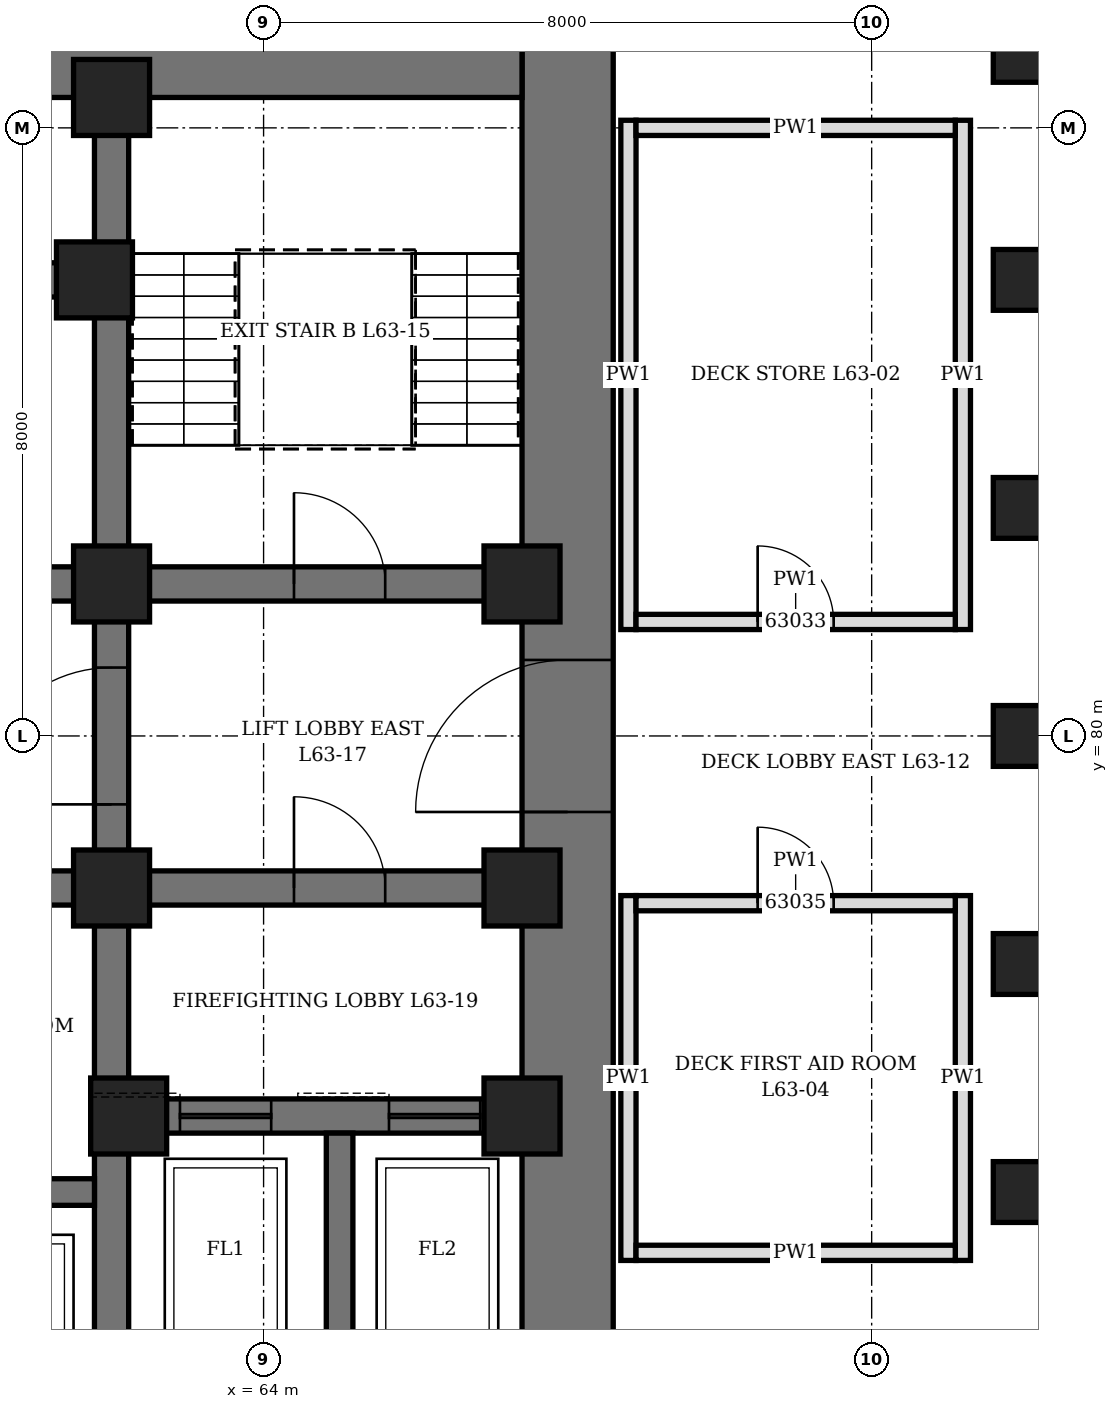
"""IFC4 building model, lengths in metres.
Left out: names, types, materials, properties, quantities, classifications, styles, units other than length and angle.
Written with IfcOpenShell. Run it as: python <this file> out.ifc"""

import sys

from ifc_helpers import new_model, si_unit, direction, frame, frame_2d, origin, origin_2d, place, context, subcontext, project, spatial, rectangle, hollow_rectangle, extrude, element, fill, save


model = new_model("IFC4")
c1 = context("Model", 3, precision=1e-05, world=origin(), true_north=direction((0.0, 1.0)))
c2 = subcontext(c1, "Body", "Model", "MODEL_VIEW")
j1 = project(units=[si_unit("LENGTHUNIT", "METRE"), si_unit("PLANEANGLEUNIT", "RADIAN")], contexts=[c1])
p1 = place(None, origin())
s1 = spatial("IfcSite", under=j1, at=p1, CompositionType="ELEMENT")
p2 = place(p1, origin())
s2 = spatial("IfcBuilding", under=s1, at=p2, CompositionType="ELEMENT")
p3 = place(p2, frame((0.0, 0.0, 279.7)))
s3 = spatial("IfcBuildingStorey", under=s2, at=p3, CompositionType="ELEMENT", Elevation=279.7)
for number, where, z_axis, x_axis in (
    (1, (74.0, 74.0, -0.25), (0.0, 0.0, 1.0), (0.0, 1.0, 0.0)),
    (2, (74.0, 77.0, -0.25), (0.0, 0.0, 1.0), (0.0, 1.0, 0.0)),
    (3, (74.0, 80.0, -0.25), (0.0, 0.0, 1.0), (0.0, 1.0, 0.0)),
    (4, (74.0, 83.0, -0.25), (0.0, 0.0, 1.0), (0.0, 1.0, 0.0)),
    (5, (74.0, 86.0, -0.25), (0.0, 0.0, 1.0), (0.0, 1.0, 0.0)),
    (6, (74.0, 89.0, -0.25), (0.0, 0.0, 1.0), (0.0, 1.0, 0.0)),
):
    element("IfcColumn", number, at=place(p3, frame(where, z_axis=z_axis, x_axis=x_axis)), inside=s3, PredefinedType="COLUMN", context=c2, shape_type="SweptSolid", body=[
        extrude(hollow_rectangle(XDim=0.8, YDim=0.8, WallThickness=0.1, at=origin_2d()), origin(), (0.0, 0.0, 1.0), 6.25),
    ])
p4 = place(p3, frame((68.0, 70.4, 0.0), z_axis=(0.0, 0.0, 1.0), x_axis=(0.0, 1.0, 0.0)))
e7 = element("IfcWall", 7, at=p4, inside=s3, PredefinedType="SHEAR", context=c2, shape_type="SweptSolid", body=[
    extrude(rectangle(XDim=19.2, YDim=1.2, at=frame_2d((9.6, 0.0))), origin(), (0.0, 0.0, 1.0), 6.0),
])
p5 = place(p4, frame((8.6, 0.0, 0.0)))
e8 = element("IfcOpeningElement", 8, at=p5, cuts=e7, PredefinedType="OPENING", context=c2, shape_type="SweptSolid", body=[
    extrude(rectangle(XDim=2.0, YDim=2.4, at=frame_2d((1.0, 1.2))), frame((0.0, 0.61, 0.0), z_axis=(0.0, -1.0, 0.0), x_axis=(1.0, 0.0, 0.0)), (0.0, 0.0, 1.0), 1.22),
])
p6 = place(p3, frame((44.6, 89.0, 0.0), z_axis=(0.0, 0.0, 1.0), x_axis=(1.0, 0.0, 0.0)))
e9 = element("IfcWall", 9, at=p6, inside=s3, PredefinedType="SHEAR", context=c2, shape_type="SweptSolid", body=[
    extrude(rectangle(XDim=22.8, YDim=1.2, at=frame_2d((11.4, 0.0))), origin(), (0.0, 0.0, 1.0), 6.0),
])
p7 = place(p6, frame((7.9, 0.0, 0.0)))
e10 = element("IfcOpeningElement", 10, at=p7, cuts=e9, PredefinedType="OPENING", context=c2, shape_type="SweptSolid", body=[
    extrude(rectangle(XDim=1.0, YDim=2.1, at=frame_2d((0.5, 1.05))), frame((0.0, 0.61, 0.0), z_axis=(0.0, -1.0, 0.0), x_axis=(1.0, 0.0, 0.0)), (0.0, 0.0, 1.0), 1.22),
])
p8 = place(p6, frame((12.025, 0.0, 0.0)))
e11 = element("IfcOpeningElement", 11, at=p8, cuts=e9, PredefinedType="OPENING", context=c2, shape_type="SweptSolid", body=[
    extrude(rectangle(XDim=0.9, YDim=2.1, at=frame_2d((0.45, 1.05))), frame((0.0, 0.61, 0.0), z_axis=(0.0, -1.0, 0.0), x_axis=(1.0, 0.0, 0.0)), (0.0, 0.0, 1.0), 1.22),
])
p9 = place(p6, frame((13.962, 0.0, 0.0)))
e12 = element("IfcOpeningElement", 12, at=p9, cuts=e9, PredefinedType="OPENING", context=c2, shape_type="SweptSolid", body=[
    extrude(rectangle(XDim=0.9, YDim=2.1, at=frame_2d((0.45, 1.05))), frame((0.0, 0.61, 0.0), z_axis=(0.0, -1.0, 0.0), x_axis=(1.0, 0.0, 0.0)), (0.0, 0.0, 1.0), 1.22),
])
p10 = place(p3, frame((62.0, 71.6, 0.0), z_axis=(0.0, 0.0, 1.0), x_axis=(0.0, 1.0, 0.0)))
e13 = element("IfcWall", 13, at=p10, inside=s3, PredefinedType="SHEAR", context=c2, shape_type="SweptSolid", body=[
    extrude(rectangle(XDim=16.8, YDim=0.45, at=frame_2d((8.4, 0.0))), origin(), (0.0, 0.0, 1.0), 6.0),
])
p11 = place(p10, frame((7.5, 0.0, 0.0)))
e14 = element("IfcOpeningElement", 14, at=p11, cuts=e13, PredefinedType="OPENING", context=c2, shape_type="SweptSolid", body=[
    extrude(rectangle(XDim=1.8, YDim=2.4, at=frame_2d((0.9, 1.2))), frame((0.0, 0.235, 0.0), z_axis=(0.0, -1.0, 0.0), x_axis=(1.0, 0.0, 0.0)), (0.0, 0.0, 1.0), 0.47),
])
p12 = place(p3, frame((62.225, 75.0, 0.0), z_axis=(0.0, 0.0, 1.0), x_axis=(1.0, 0.0, 0.0)))
e15 = element("IfcWall", 15, at=p12, inside=s3, PredefinedType="SHEAR", context=c2, shape_type="SweptSolid", body=[
    extrude(rectangle(XDim=5.175, YDim=0.45, at=frame_2d((2.587, 0.0))), origin(), (0.0, 0.0, 1.0), 6.0),
])
p13 = place(p12, frame((0.675, 0.0, 0.0)))
e16 = element("IfcOpeningElement", 16, at=p13, cuts=e15, PredefinedType="OPENING", context=c2, shape_type="SweptSolid", body=[
    extrude(rectangle(XDim=1.2, YDim=2.2, at=frame_2d((0.6, 1.1))), frame((0.0, 0.235, 0.0), z_axis=(0.0, -1.0, 0.0), x_axis=(1.0, 0.0, 0.0)), (0.0, 0.0, 1.0), 0.47),
])
p14 = place(p12, frame((3.425, 0.0, 0.0)))
e17 = element("IfcOpeningElement", 17, at=p14, cuts=e15, PredefinedType="OPENING", context=c2, shape_type="SweptSolid", body=[
    extrude(rectangle(XDim=1.2, YDim=2.2, at=frame_2d((0.6, 1.1))), frame((0.0, 0.235, 0.0), z_axis=(0.0, -1.0, 0.0), x_axis=(1.0, 0.0, 0.0)), (0.0, 0.0, 1.0), 0.47),
])
p15 = place(p3, frame((62.225, 78.0, 0.0), z_axis=(0.0, 0.0, 1.0), x_axis=(1.0, 0.0, 0.0)))
e18 = element("IfcWall", 18, at=p15, inside=s3, PredefinedType="SHEAR", context=c2, shape_type="SweptSolid", body=[
    extrude(rectangle(XDim=5.175, YDim=0.45, at=frame_2d((2.587, 0.0))), origin(), (0.0, 0.0, 1.0), 6.0),
])
p16 = place(p15, frame((2.175, 0.0, 0.0)))
e19 = element("IfcOpeningElement", 19, at=p16, cuts=e18, PredefinedType="OPENING", context=c2, shape_type="SweptSolid", body=[
    extrude(rectangle(XDim=1.2, YDim=2.1, at=frame_2d((0.6, 1.05))), frame((0.0, 0.235, 0.0), z_axis=(0.0, -1.0, 0.0), x_axis=(1.0, 0.0, 0.0)), (0.0, 0.0, 1.0), 0.47),
])
p17 = place(p3, frame((62.225, 82.0, 0.0), z_axis=(0.0, 0.0, 1.0), x_axis=(1.0, 0.0, 0.0)))
e20 = element("IfcWall", 20, at=p17, inside=s3, PredefinedType="SHEAR", context=c2, shape_type="SweptSolid", body=[
    extrude(rectangle(XDim=5.175, YDim=0.45, at=frame_2d((2.587, 0.0))), origin(), (0.0, 0.0, 1.0), 6.0),
])
p18 = place(p17, frame((2.175, 0.0, 0.0)))
e21 = element("IfcOpeningElement", 21, at=p18, cuts=e20, PredefinedType="OPENING", context=c2, shape_type="SweptSolid", body=[
    extrude(rectangle(XDim=1.2, YDim=2.1, at=frame_2d((0.6, 1.05))), frame((0.0, 0.235, 0.0), z_axis=(0.0, -1.0, 0.0), x_axis=(1.0, 0.0, 0.0)), (0.0, 0.0, 1.0), 0.47),
])
p19 = place(p3, frame((50.225, 78.0, 0.0), z_axis=(0.0, 0.0, 1.0), x_axis=(1.0, 0.0, 0.0)))
e22 = element("IfcWall", 22, at=p19, inside=s3, PredefinedType="SHEAR", context=c2, shape_type="SweptSolid", body=[
    extrude(rectangle(XDim=11.55, YDim=0.45, at=frame_2d((5.775, 0.0))), origin(), (0.0, 0.0, 1.0), 6.0),
])
p20 = place(p19, frame((0.825, 0.0, 0.0)))
e23 = element("IfcOpeningElement", 23, at=p20, cuts=e22, PredefinedType="OPENING", context=c2, shape_type="SweptSolid", body=[
    extrude(rectangle(XDim=0.9, YDim=2.1, at=frame_2d((0.45, 1.05))), frame((0.0, 0.235, 0.0), z_axis=(0.0, -1.0, 0.0), x_axis=(1.0, 0.0, 0.0)), (0.0, 0.0, 1.0), 0.47),
])
p21 = place(p19, frame((3.825, 0.0, 0.0)))
e24 = element("IfcOpeningElement", 24, at=p21, cuts=e22, PredefinedType="OPENING", context=c2, shape_type="SweptSolid", body=[
    extrude(rectangle(XDim=0.9, YDim=2.1, at=frame_2d((0.45, 1.05))), frame((0.0, 0.235, 0.0), z_axis=(0.0, -1.0, 0.0), x_axis=(1.0, 0.0, 0.0)), (0.0, 0.0, 1.0), 0.47),
])
p22 = place(p19, frame((6.825, 0.0, 0.0)))
e25 = element("IfcOpeningElement", 25, at=p22, cuts=e22, PredefinedType="OPENING", context=c2, shape_type="SweptSolid", body=[
    extrude(rectangle(XDim=0.9, YDim=2.1, at=frame_2d((0.45, 1.05))), frame((0.0, 0.235, 0.0), z_axis=(0.0, -1.0, 0.0), x_axis=(1.0, 0.0, 0.0)), (0.0, 0.0, 1.0), 0.47),
])
p23 = place(p19, frame((9.825, 0.0, 0.0)))
e26 = element("IfcOpeningElement", 26, at=p23, cuts=e22, PredefinedType="OPENING", context=c2, shape_type="SweptSolid", body=[
    extrude(rectangle(XDim=0.9, YDim=2.1, at=frame_2d((0.45, 1.05))), frame((0.0, 0.235, 0.0), z_axis=(0.0, -1.0, 0.0), x_axis=(1.0, 0.0, 0.0)), (0.0, 0.0, 1.0), 0.47),
])
p24 = place(p3, frame((50.225, 82.0, 0.0), z_axis=(0.0, 0.0, 1.0), x_axis=(1.0, 0.0, 0.0)))
e27 = element("IfcWall", 27, at=p24, inside=s3, PredefinedType="SHEAR", context=c2, shape_type="SweptSolid", body=[
    extrude(rectangle(XDim=11.55, YDim=0.45, at=frame_2d((5.775, 0.0))), origin(), (0.0, 0.0, 1.0), 6.0),
])
p25 = place(p24, frame((0.825, 0.0, 0.0)))
e28 = element("IfcOpeningElement", 28, at=p25, cuts=e27, PredefinedType="OPENING", context=c2, shape_type="SweptSolid", body=[
    extrude(rectangle(XDim=0.9, YDim=2.1, at=frame_2d((0.45, 1.05))), frame((0.0, 0.235, 0.0), z_axis=(0.0, -1.0, 0.0), x_axis=(1.0, 0.0, 0.0)), (0.0, 0.0, 1.0), 0.47),
])
p26 = place(p24, frame((3.825, 0.0, 0.0)))
e29 = element("IfcOpeningElement", 29, at=p26, cuts=e27, PredefinedType="OPENING", context=c2, shape_type="SweptSolid", body=[
    extrude(rectangle(XDim=0.9, YDim=2.1, at=frame_2d((0.45, 1.05))), frame((0.0, 0.235, 0.0), z_axis=(0.0, -1.0, 0.0), x_axis=(1.0, 0.0, 0.0)), (0.0, 0.0, 1.0), 0.47),
])
p27 = place(p24, frame((6.825, 0.0, 0.0)))
e30 = element("IfcOpeningElement", 30, at=p27, cuts=e27, PredefinedType="OPENING", context=c2, shape_type="SweptSolid", body=[
    extrude(rectangle(XDim=0.9, YDim=2.1, at=frame_2d((0.45, 1.05))), frame((0.0, 0.235, 0.0), z_axis=(0.0, -1.0, 0.0), x_axis=(1.0, 0.0, 0.0)), (0.0, 0.0, 1.0), 0.47),
])
p28 = place(p24, frame((9.825, 0.0, 0.0)))
e31 = element("IfcOpeningElement", 31, at=p28, cuts=e27, PredefinedType="OPENING", context=c2, shape_type="SweptSolid", body=[
    extrude(rectangle(XDim=0.9, YDim=2.1, at=frame_2d((0.45, 1.05))), frame((0.0, 0.235, 0.0), z_axis=(0.0, -1.0, 0.0), x_axis=(1.0, 0.0, 0.0)), (0.0, 0.0, 1.0), 0.47),
])
p29 = place(p3, frame((50.225, 86.0, 0.0), z_axis=(0.0, 0.0, 1.0), x_axis=(1.0, 0.0, 0.0)))
e32 = element("IfcWall", 32, at=p29, inside=s3, PredefinedType="SHEAR", context=c2, shape_type="SweptSolid", body=[
    extrude(rectangle(XDim=11.55, YDim=0.45, at=frame_2d((5.775, 0.0))), origin(), (0.0, 0.0, 1.0), 6.0),
])
p30 = place(p3, frame((50.225, 74.0, 0.0), z_axis=(0.0, 0.0, 1.0), x_axis=(1.0, 0.0, 0.0)))
e33 = element("IfcWall", 33, at=p30, inside=s3, PredefinedType="SHEAR", context=c2, shape_type="SweptSolid", body=[
    extrude(rectangle(XDim=11.55, YDim=0.35, at=frame_2d((5.775, 0.0))), origin(), (0.0, 0.0, 1.0), 6.0),
])
p31 = place(p3, frame((65.0, 71.6, 0.0), z_axis=(0.0, 0.0, 1.0), x_axis=(0.0, 1.0, 0.0)))
e34 = element("IfcWall", 34, at=p31, inside=s3, PredefinedType="SHEAR", context=c2, shape_type="SweptSolid", body=[
    extrude(rectangle(XDim=3.175, YDim=0.35, at=frame_2d((1.587, 0.0))), origin(), (0.0, 0.0, 1.0), 6.0),
])
for number, where, z_axis, x_axis in (
    (35, (61.775, 86.0, 0.0), (0.0, 0.0, 1.0), (1.0, 0.0, 0.0)),
    (36, (62.0, 78.0, 0.0), (0.0, 0.0, 1.0), (1.0, 0.0, 0.0)),
    (37, (62.0, 82.0, 0.0), (0.0, 0.0, 1.0), (1.0, 0.0, 0.0)),
    (38, (62.0, 88.4, 0.0), (0.0, 0.0, 1.0), (1.0, 0.0, 0.0)),
    (39, (62.225, 75.0, 0.0), (0.0, 0.0, 1.0), (1.0, 0.0, 0.0)),
    (40, (67.4, 75.0, 0.0), (0.0, 0.0, 1.0), (1.0, 0.0, 0.0)),
    (41, (67.4, 78.0, 0.0), (0.0, 0.0, 1.0), (1.0, 0.0, 0.0)),
    (42, (67.4, 82.0, 0.0), (0.0, 0.0, 1.0), (1.0, 0.0, 0.0)),
):
    element("IfcColumn", number, at=place(p3, frame(where, z_axis=z_axis, x_axis=x_axis)), inside=s3, PredefinedType="COLUMN", context=c2, shape_type="SweptSolid", body=[
        extrude(hollow_rectangle(XDim=1.0, YDim=1.0, WallThickness=0.15, at=origin_2d()), origin(), (0.0, 0.0, 1.0), 6.0),
    ])
for number, where, z_axis, x_axis in (
    (43, (68.8, 81.4, 0.0), (0.0, 0.0, 1.0), (0.0, 1.0, 0.0)),
    (44, (73.2, 81.4, 0.0), (0.0, 0.0, 1.0), (0.0, 1.0, 0.0)),
):
    element("IfcWall", number, at=place(p3, frame(where, z_axis=z_axis, x_axis=x_axis)), inside=s3, PredefinedType="PARTITIONING", context=c2, shape_type="SweptSolid", body=[
        extrude(rectangle(XDim=6.7, YDim=0.2, at=frame_2d((3.35, 0.0))), origin(), (0.0, 0.0, 1.0), 5.75),
    ])
p32 = place(p3, frame((68.9, 81.5, 0.0), z_axis=(0.0, 0.0, 1.0), x_axis=(1.0, 0.0, 0.0)))
e45 = element("IfcWall", 45, at=p32, inside=s3, PredefinedType="PARTITIONING", context=c2, shape_type="SweptSolid", body=[
    extrude(rectangle(XDim=4.2, YDim=0.2, at=frame_2d((2.1, 0.0))), origin(), (0.0, 0.0, 1.0), 5.75),
])
p33 = place(p32, frame((1.6, 0.0, 0.0)))
e46 = element("IfcOpeningElement", 46, at=p33, cuts=e45, PredefinedType="OPENING", context=c2, shape_type="SweptSolid", body=[
    extrude(rectangle(XDim=1.0, YDim=2.1, at=frame_2d((0.5, 1.05))), frame((0.0, 0.11, 0.0), z_axis=(0.0, -1.0, 0.0), x_axis=(1.0, 0.0, 0.0)), (0.0, 0.0, 1.0), 0.22),
])
p34 = place(p3, frame((68.9, 88.0, 0.0), z_axis=(0.0, 0.0, 1.0), x_axis=(1.0, 0.0, 0.0)))
e47 = element("IfcWall", 47, at=p34, inside=s3, PredefinedType="PARTITIONING", context=c2, shape_type="SweptSolid", body=[
    extrude(rectangle(XDim=4.2, YDim=0.2, at=frame_2d((2.1, 0.0))), origin(), (0.0, 0.0, 1.0), 5.75),
])
for number, where, z_axis, x_axis in (
    (48, (68.8, 73.1, 0.0), (0.0, 0.0, 1.0), (0.0, 1.0, 0.0)),
    (49, (73.2, 73.1, 0.0), (0.0, 0.0, 1.0), (0.0, 1.0, 0.0)),
):
    element("IfcWall", number, at=place(p3, frame(where, z_axis=z_axis, x_axis=x_axis)), inside=s3, PredefinedType="PARTITIONING", context=c2, shape_type="SweptSolid", body=[
        extrude(rectangle(XDim=4.8, YDim=0.2, at=frame_2d((2.4, 0.0))), origin(), (0.0, 0.0, 1.0), 5.75),
    ])
p35 = place(p3, frame((68.9, 73.2, 0.0), z_axis=(0.0, 0.0, 1.0), x_axis=(1.0, 0.0, 0.0)))
e50 = element("IfcWall", 50, at=p35, inside=s3, PredefinedType="PARTITIONING", context=c2, shape_type="SweptSolid", body=[
    extrude(rectangle(XDim=4.2, YDim=0.2, at=frame_2d((2.1, 0.0))), origin(), (0.0, 0.0, 1.0), 5.75),
])
p36 = place(p3, frame((68.9, 77.8, 0.0), z_axis=(0.0, 0.0, 1.0), x_axis=(1.0, 0.0, 0.0)))
e51 = element("IfcWall", 51, at=p36, inside=s3, PredefinedType="PARTITIONING", context=c2, shape_type="SweptSolid", body=[
    extrude(rectangle(XDim=4.2, YDim=0.2, at=frame_2d((2.1, 0.0))), origin(), (0.0, 0.0, 1.0), 5.75),
])
p37 = place(p36, frame((1.6, 0.0, 0.0)))
e52 = element("IfcOpeningElement", 52, at=p37, cuts=e51, PredefinedType="OPENING", context=c2, shape_type="SweptSolid", body=[
    extrude(rectangle(XDim=1.0, YDim=2.1, at=frame_2d((0.5, 1.05))), frame((0.0, 0.11, 0.0), z_axis=(0.0, -1.0, 0.0), x_axis=(1.0, 0.0, 0.0)), (0.0, 0.0, 1.0), 0.22),
])
p38 = place(p18, origin())
e53 = element("IfcDoor", 53, at=p38, inside=s3, OperationType="SINGLE_SWING_LEFT", PredefinedType="DOOR", context=c2, shape_type="SweptSolid", body=[
    extrude(rectangle(XDim=1.2, YDim=2.1, at=frame_2d((0.6, 1.05))), frame((0.0, 0.225, 0.0), z_axis=(0.0, -1.0, 0.0), x_axis=(1.0, 0.0, 0.0)), (0.0, 0.0, 1.0), 0.449),
])
fill(e21, e53)
p39 = place(p5, origin())
e54 = element("IfcDoor", 54, at=p39, inside=s3, OperationType="DOUBLE_DOOR_SINGLE_SWING", PredefinedType="DOOR", context=c2, shape_type="SweptSolid", body=[
    extrude(rectangle(XDim=2.0, YDim=2.4, at=frame_2d((1.0, 1.2))), frame((0.0, 0.35, 0.0), z_axis=(0.0, -1.0, 0.0), x_axis=(1.0, 0.0, 0.0)), (0.0, 0.0, 1.0), 0.7),
])
fill(e8, e54)
p40 = place(p11, origin())
e55 = element("IfcDoor", 55, at=p40, inside=s3, OperationType="DOUBLE_DOOR_SINGLE_SWING", PredefinedType="DOOR", context=c2, shape_type="SweptSolid", body=[
    extrude(rectangle(XDim=1.8, YDim=2.4, at=frame_2d((0.9, 1.2))), frame((0.0, 0.225, 0.0), z_axis=(0.0, -1.0, 0.0), x_axis=(1.0, 0.0, 0.0)), (0.0, 0.0, 1.0), 0.449),
])
fill(e14, e55)
p41 = place(p16, origin())
e56 = element("IfcDoor", 56, at=p41, inside=s3, OperationType="SINGLE_SWING_RIGHT", PredefinedType="DOOR", context=c2, shape_type="SweptSolid", body=[
    extrude(rectangle(XDim=1.2, YDim=2.1, at=frame_2d((0.6, 1.05))), frame((0.0, 0.225, 0.0), z_axis=(0.0, -1.0, 0.0), x_axis=(1.0, 0.0, 0.0)), (0.0, 0.0, 1.0), 0.449),
])
fill(e19, e56)
p42 = place(p13, origin())
e57 = element("IfcDoor", 57, at=p42, inside=s3, OperationType="SLIDING_TO_LEFT", PredefinedType="DOOR", context=c2, shape_type="SweptSolid", body=[
    extrude(rectangle(XDim=1.2, YDim=2.2, at=frame_2d((0.6, 1.1))), frame((0.0, 0.225, 0.0), z_axis=(0.0, -1.0, 0.0), x_axis=(1.0, 0.0, 0.0)), (0.0, 0.0, 1.0), 0.449),
])
fill(e16, e57)
p43 = place(p14, origin())
e58 = element("IfcDoor", 58, at=p43, inside=s3, OperationType="SLIDING_TO_LEFT", PredefinedType="DOOR", context=c2, shape_type="SweptSolid", body=[
    extrude(rectangle(XDim=1.2, YDim=2.2, at=frame_2d((0.6, 1.1))), frame((0.0, 0.225, 0.0), z_axis=(0.0, -1.0, 0.0), x_axis=(1.0, 0.0, 0.0)), (0.0, 0.0, 1.0), 0.449),
])
fill(e17, e58)
p44 = place(p33, origin())
e59 = element("IfcDoor", 59, at=p44, inside=s3, OperationType="SINGLE_SWING_LEFT", PredefinedType="DOOR", context=c2, shape_type="SweptSolid", body=[
    extrude(rectangle(XDim=1.0, YDim=2.1, at=frame_2d((0.5, 1.05))), frame((0.0, 0.1, 0.0), z_axis=(0.0, -1.0, 0.0), x_axis=(1.0, 0.0, 0.0)), (0.0, 0.0, 1.0), 0.199),
])
fill(e46, e59)
p45 = place(p37, origin())
e60 = element("IfcDoor", 60, at=p45, inside=s3, OperationType="SINGLE_SWING_LEFT", PredefinedType="DOOR", context=c2, shape_type="SweptSolid", body=[
    extrude(rectangle(XDim=1.0, YDim=2.1, at=frame_2d((0.5, 1.05))), frame((0.0, 0.1, 0.0), z_axis=(0.0, -1.0, 0.0), x_axis=(1.0, 0.0, 0.0)), (0.0, 0.0, 1.0), 0.199),
])
fill(e52, e60)
save(model, sys.argv[1])
